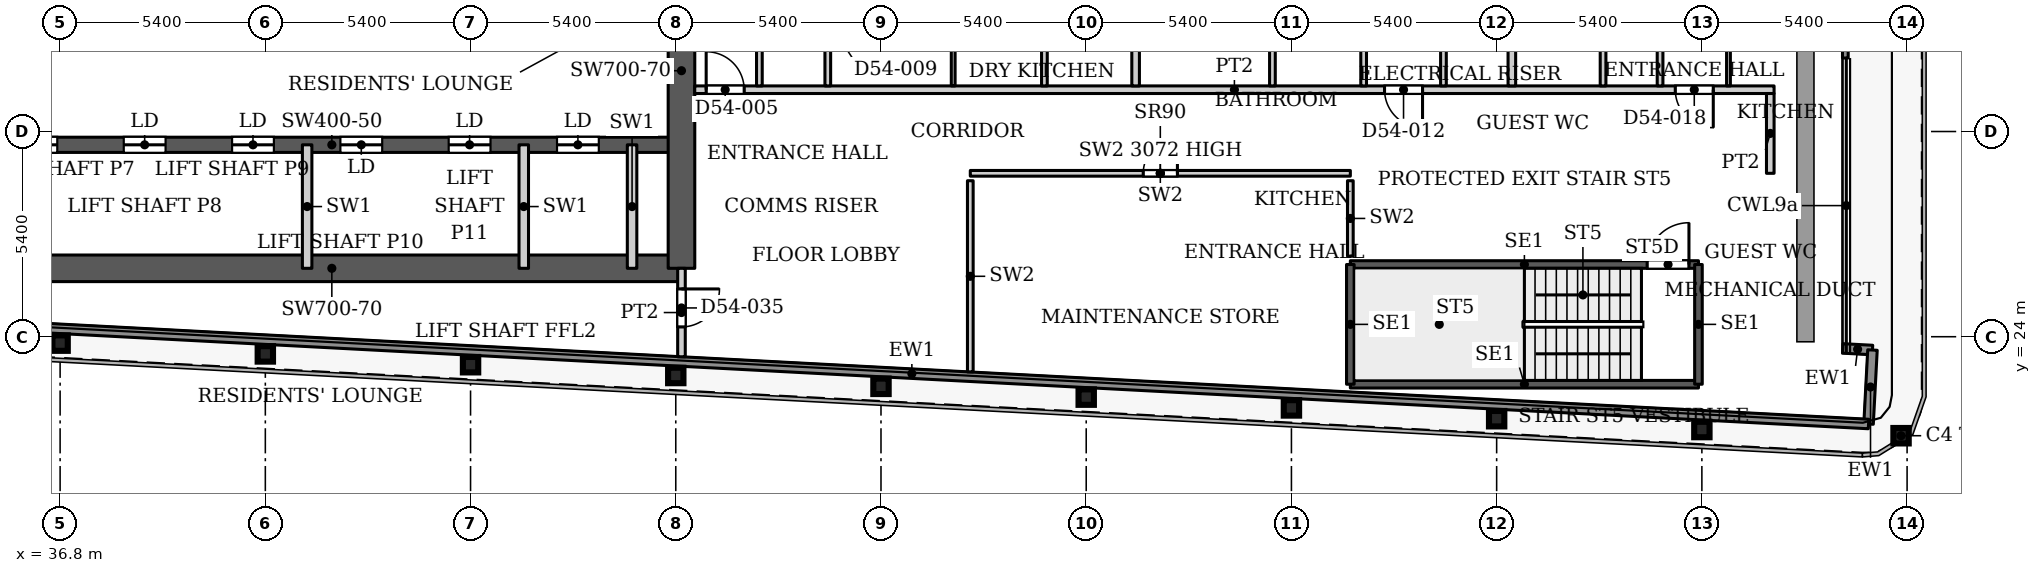
"""IFC4 building model, lengths in metres.
Left out: names, types, materials, properties, quantities, classifications, styles, units other than length and angle.
Written with IfcOpenShell. Run it as: python <this file> out.ifc"""

import sys

from ifc_helpers import new_model, si_unit, direction, frame, frame_2d, origin, origin_2d, place, context, subcontext, project, spatial, rectangle, i_section, extrude, source, transform, mapped, element, fill, save


model = new_model("IFC4")
c1 = context("Model", 3, precision=1e-05, world=origin(), true_north=direction((0.0, 1.0)))
c2 = subcontext(c1, "Body", "Model", "MODEL_VIEW")
j1 = project(units=[si_unit("LENGTHUNIT", "METRE"), si_unit("PLANEANGLEUNIT", "RADIAN")], contexts=[c1])
p1 = place(None, origin())
s1 = spatial("IfcSite", under=j1, at=p1, CompositionType="ELEMENT")
p2 = place(p1, origin())
s2 = spatial("IfcBuilding", under=s1, at=p2, CompositionType="ELEMENT")
p3 = place(p2, frame((0.0, 0.0, 235.7)))
s3 = spatial("IfcBuildingStorey", under=s2, at=p3, CompositionType="ELEMENT", Elevation=235.7)
for number, where, z_axis, x_axis in (
    (1, (85.241, 21.395, 0.0), (0.0, 0.0, 1.0), (1.0, 0.0, 0.0)),
    (2, (80.0, 21.558, 0.0), (0.0, 0.0, 1.0), (1.0, 0.0, 0.0)),
    (3, (74.6, 21.843, 0.0), (0.0, 0.0, 1.0), (1.0, 0.0, 0.0)),
    (4, (69.2, 22.127, 0.0), (0.0, 0.0, 1.0), (1.0, 0.0, 0.0)),
    (5, (63.8, 22.411, 0.0), (0.0, 0.0, 1.0), (1.0, 0.0, 0.0)),
    (6, (58.4, 22.695, 0.0), (0.0, 0.0, 1.0), (1.0, 0.0, 0.0)),
    (7, (53.0, 22.98, 0.0), (0.0, 0.0, 1.0), (1.0, 0.0, 0.0)),
    (8, (47.6, 23.264, 0.0), (0.0, 0.0, 1.0), (1.0, 0.0, 0.0)),
    (9, (42.2, 23.548, 0.0), (0.0, 0.0, 1.0), (1.0, 0.0, 0.0)),
    (10, (36.8, 23.832, 0.0), (0.0, 0.0, 1.0), (1.0, 0.0, 0.0)),
):
    element("IfcColumn", number, at=place(p3, frame(where, z_axis=z_axis, x_axis=x_axis)), inside=s3, PredefinedType="COLUMN", context=c2, shape_type="SweptSolid", body=[
        extrude(i_section(OverallWidth=0.404, OverallDepth=0.407, WebThickness=0.027, FlangeThickness=0.044, FilletRadius=0.012, at=origin_2d()), origin(), (0.0, 0.0, 1.0), 3.9),
    ])
p4 = place(p3, frame((34.75, 25.8, 0.0), z_axis=(0.0, 0.0, 1.0), x_axis=(1.0, 0.0, 0.0)))
e11 = element("IfcWall", 11, at=p4, inside=s3, PredefinedType="SHEAR", context=c2, shape_type="SweptSolid", body=[
    extrude(rectangle(XDim=18.4, YDim=0.7, at=frame_2d((9.2, 0.0))), origin(), (0.0, 0.0, 1.0), 3.9),
])
p5 = place(p3, frame((34.75, 29.05, 0.0), z_axis=(0.0, 0.0, 1.0), x_axis=(1.0, 0.0, 0.0)))
e12 = element("IfcWall", 12, at=p5, inside=s3, PredefinedType="SHEAR", context=c2, shape_type="SweptSolid", body=[
    extrude(rectangle(XDim=18.4, YDim=0.4, at=frame_2d((9.2, 0.0))), origin(), (0.0, 0.0, 1.0), 3.9),
])
p6 = place(p5, frame((0.875, 0.0, 0.0)))
e13 = element("IfcOpeningElement", 13, at=p6, cuts=e12, PredefinedType="OPENING", context=c2, shape_type="SweptSolid", body=[
    extrude(rectangle(XDim=1.1, YDim=2.2, at=frame_2d((0.55, 1.1))), frame((0.0, 0.21, 0.0), z_axis=(0.0, -1.0, 0.0), x_axis=(1.0, 0.0, 0.0)), (0.0, 0.0, 1.0), 0.42),
])
p7 = place(p5, frame((3.725, 0.0, 0.0)))
e14 = element("IfcOpeningElement", 14, at=p7, cuts=e12, PredefinedType="OPENING", context=c2, shape_type="SweptSolid", body=[
    extrude(rectangle(XDim=1.1, YDim=2.2, at=frame_2d((0.55, 1.1))), frame((0.0, 0.21, 0.0), z_axis=(0.0, -1.0, 0.0), x_axis=(1.0, 0.0, 0.0)), (0.0, 0.0, 1.0), 0.42),
])
p8 = place(p5, frame((6.575, 0.0, 0.0)))
e15 = element("IfcOpeningElement", 15, at=p8, cuts=e12, PredefinedType="OPENING", context=c2, shape_type="SweptSolid", body=[
    extrude(rectangle(XDim=1.1, YDim=2.2, at=frame_2d((0.55, 1.1))), frame((0.0, 0.21, 0.0), z_axis=(0.0, -1.0, 0.0), x_axis=(1.0, 0.0, 0.0)), (0.0, 0.0, 1.0), 0.42),
])
p9 = place(p5, frame((9.425, 0.0, 0.0)))
e16 = element("IfcOpeningElement", 16, at=p9, cuts=e12, PredefinedType="OPENING", context=c2, shape_type="SweptSolid", body=[
    extrude(rectangle(XDim=1.1, YDim=2.2, at=frame_2d((0.55, 1.1))), frame((0.0, 0.21, 0.0), z_axis=(0.0, -1.0, 0.0), x_axis=(1.0, 0.0, 0.0)), (0.0, 0.0, 1.0), 0.42),
])
p10 = place(p5, frame((12.275, 0.0, 0.0)))
e17 = element("IfcOpeningElement", 17, at=p10, cuts=e12, PredefinedType="OPENING", context=c2, shape_type="SweptSolid", body=[
    extrude(rectangle(XDim=1.1, YDim=2.2, at=frame_2d((0.55, 1.1))), frame((0.0, 0.21, 0.0), z_axis=(0.0, -1.0, 0.0), x_axis=(1.0, 0.0, 0.0)), (0.0, 0.0, 1.0), 0.42),
])
p11 = place(p5, frame((15.125, 0.0, 0.0)))
e18 = element("IfcOpeningElement", 18, at=p11, cuts=e12, PredefinedType="OPENING", context=c2, shape_type="SweptSolid", body=[
    extrude(rectangle(XDim=1.1, YDim=2.2, at=frame_2d((0.55, 1.1))), frame((0.0, 0.21, 0.0), z_axis=(0.0, -1.0, 0.0), x_axis=(1.0, 0.0, 0.0)), (0.0, 0.0, 1.0), 0.42),
])
p12 = place(p3, frame((53.15, 25.8, 0.0), z_axis=(0.0, 0.0, 1.0), x_axis=(0.0, 1.0, 0.0)))
e19 = element("IfcWall", 19, at=p12, inside=s3, PredefinedType="SHEAR", context=c2, shape_type="SweptSolid", body=[
    extrude(rectangle(XDim=10.4, YDim=0.7, at=frame_2d((5.2, 0.0))), origin(), (0.0, 0.0, 1.0), 3.9),
])
p13 = place(p3, frame((83.775, 33.733, 0.0), z_axis=(0.0, 0.0, 1.0), x_axis=(0.0, -1.0, 0.0)))
e20 = element("IfcWall", 20, at=p13, inside=s3, PredefinedType="SOLIDWALL", context=c2, shape_type="SweptSolid", body=[
    extrude(rectangle(XDim=2.399, YDim=0.15, at=frame_2d((1.199, 0.0))), origin(), (0.0, 0.0, 1.0), 3.75),
])
p14 = place(p13, frame((0.3, 0.0, 0.0)))
e21 = element("IfcOpeningElement", 21, at=p14, cuts=e20, PredefinedType="OPENING", context=c2, shape_type="SweptSolid", body=[
    extrude(rectangle(XDim=1.8, YDim=2.4, at=frame_2d((0.9, 1.2))), frame((0.0, 0.085, 0.0), z_axis=(0.0, -1.0, 0.0), x_axis=(1.0, 0.0, 0.0)), (0.0, 0.0, 1.0), 0.17),
])
p15 = place(p3, frame((83.707, 23.692, 0.0), z_axis=(0.0, 0.0, 1.0), x_axis=(0.998561284263, -0.053622398031, 0.0)))
e22 = element("IfcWall", 22, at=p15, inside=s3, PredefinedType="SOLIDWALL", context=c2, shape_type="SweptSolid", body=[
    extrude(rectangle(XDim=0.783, YDim=0.25, at=frame_2d((0.392, 0.0))), origin(), (0.0, 0.0, 1.0), 3.75),
])
p16 = place(p3, frame((84.489, 23.65, 0.0), z_axis=(0.0, 0.0, 1.0), x_axis=(-0.052841433274, -0.998602915542, 0.0)))
e23 = element("IfcWall", 23, at=p16, inside=s3, PredefinedType="SOLIDWALL", context=c2, shape_type="SweptSolid", body=[
    extrude(rectangle(XDim=1.95, YDim=0.25, at=frame_2d((0.975, 0.0))), origin(), (0.0, 0.0, 1.0), 3.75),
])
p17 = place(p3, frame((84.386, 21.703, 0.0), z_axis=(0.0, 0.0, 1.0), x_axis=(-0.998617508267, 0.05256493302, 0.0)))
e24 = element("IfcWall", 24, at=p17, inside=s3, PredefinedType="SOLIDWALL", context=c2, shape_type="SweptSolid", body=[
    extrude(rectangle(XDim=50.417, YDim=0.25, at=frame_2d((25.208, 0.0))), origin(), (0.0, 0.0, 1.0), 3.75),
])
p18 = place(p3, frame((70.75, 22.75, 0.0), z_axis=(0.0, 0.0, 1.0), x_axis=(1.0, 0.0, 0.0)))
e25 = element("IfcWall", 25, at=p18, inside=s3, PredefinedType="SHEAR", context=c2, shape_type="SweptSolid", body=[
    extrude(rectangle(XDim=9.16, YDim=0.2, at=frame_2d((4.58, 0.0))), origin(), (0.0, 0.0, 1.0), 3.9),
])
p19 = place(p3, frame((70.75, 25.9, 0.0), z_axis=(0.0, 0.0, 1.0), x_axis=(1.0, 0.0, 0.0)))
e26 = element("IfcWall", 26, at=p19, inside=s3, PredefinedType="SHEAR", context=c2, shape_type="SweptSolid", body=[
    extrude(rectangle(XDim=9.16, YDim=0.2, at=frame_2d((4.58, 0.0))), origin(), (0.0, 0.0, 1.0), 3.9),
])
p20 = place(p19, frame((7.81, 0.0, 0.0)))
e27 = element("IfcOpeningElement", 27, at=p20, cuts=e26, PredefinedType="OPENING", context=c2, shape_type="SweptSolid", body=[
    extrude(rectangle(XDim=1.1, YDim=2.2, at=frame_2d((0.55, 1.1))), frame((0.0, 0.11, 0.0), z_axis=(0.0, -1.0, 0.0), x_axis=(1.0, 0.0, 0.0)), (0.0, 0.0, 1.0), 0.22),
])
for number, where, z_axis, x_axis in (
    (28, (70.75, 22.75, 0.0), (0.0, 0.0, 1.0), (0.0, 1.0, 0.0)),
    (29, (79.91, 22.75, 0.0), (0.0, 0.0, 1.0), (0.0, 1.0, 0.0)),
):
    element("IfcWall", number, at=place(p3, frame(where, z_axis=z_axis, x_axis=x_axis)), inside=s3, PredefinedType="SHEAR", context=c2, shape_type="SweptSolid", body=[
        extrude(rectangle(XDim=3.15, YDim=0.2, at=frame_2d((1.575, 0.0))), origin(), (0.0, 0.0, 1.0), 3.9),
    ])
for number, where, z_axis, x_axis in (
    (30, (43.3, 25.8, 0.0), (0.0, 0.0, 1.0), (0.0, 1.0, 0.0)),
    (31, (49.0, 25.8, 0.0), (0.0, 0.0, 1.0), (0.0, 1.0, 0.0)),
    (32, (51.85, 25.8, 0.0), (0.0, 0.0, 1.0), (0.0, 1.0, 0.0)),
):
    element("IfcWall", number, at=place(p3, frame(where, z_axis=z_axis, x_axis=x_axis)), inside=s3, PredefinedType="PARTITIONING", context=c2, shape_type="SweptSolid", body=[
        extrude(rectangle(XDim=3.25, YDim=0.25, at=frame_2d((1.625, 0.0))), origin(), (0.0, 0.0, 1.0), 3.9),
    ])
p21 = place(p3, frame((60.75, 28.3, 0.0), z_axis=(0.0, 0.0, 1.0), x_axis=(1.0, 0.0, 0.0)))
e33 = element("IfcWall", 33, at=p21, inside=s3, PredefinedType="PARTITIONING", context=c2, shape_type="SweptSolid", body=[
    extrude(rectangle(XDim=10.0, YDim=0.15, at=frame_2d((5.0, 0.0))), origin(), (0.0, 0.0, 1.0), 3.072),
])
p22 = place(p21, frame((4.55, 0.0, 0.0)))
e34 = element("IfcOpeningElement", 34, at=p22, cuts=e33, PredefinedType="OPENING", context=c2, shape_type="SweptSolid", body=[
    extrude(rectangle(XDim=0.9, YDim=2.2, at=frame_2d((0.45, 1.1))), frame((0.0, 0.085, 0.0), z_axis=(0.0, -1.0, 0.0), x_axis=(1.0, 0.0, 0.0)), (0.0, 0.0, 1.0), 0.17),
])
p23 = place(p3, frame((60.75, 23.075, 0.0), z_axis=(0.0, 0.0, 1.0), x_axis=(0.0, 1.0, 0.0)))
e35 = element("IfcWall", 35, at=p23, inside=s3, PredefinedType="PARTITIONING", context=c2, shape_type="SweptSolid", body=[
    extrude(rectangle(XDim=5.03, YDim=0.15, at=frame_2d((2.515, 0.0))), origin(), (0.0, 0.0, 1.0), 3.9),
])
p24 = place(p3, frame((70.75, 26.12, 0.0), z_axis=(0.0, 0.0, 1.0), x_axis=(0.0, 1.0, 0.0)))
e36 = element("IfcWall", 36, at=p24, inside=s3, PredefinedType="PARTITIONING", context=c2, shape_type="SweptSolid", body=[
    extrude(rectangle(XDim=1.985, YDim=0.15, at=frame_2d((0.992, 0.0))), origin(), (0.0, 0.0, 1.0), 3.9),
])
p25 = place(p3, frame((53.15, 23.472, 0.0), z_axis=(0.0, 0.0, 1.0), x_axis=(0.0, 1.0, 0.0)))
e37 = element("IfcWall", 37, at=p25, inside=s3, PredefinedType="PARTITIONING", context=c2, shape_type="SweptSolid", body=[
    extrude(rectangle(XDim=2.328, YDim=0.2, at=frame_2d((1.164, 0.0))), origin(), (0.0, 0.0, 1.0), 3.6),
])
p26 = place(p25, frame((0.785, 0.0, 0.0)))
e38 = element("IfcOpeningElement", 38, at=p26, cuts=e37, PredefinedType="OPENING", context=c2, shape_type="SweptSolid", body=[
    extrude(rectangle(XDim=1.0, YDim=2.1, at=frame_2d((0.5, 1.05))), frame((0.0, 0.11, 0.0), z_axis=(0.0, -1.0, 0.0), x_axis=(1.0, 0.0, 0.0)), (0.0, 0.0, 1.0), 0.22),
])
p27 = place(p3, frame((53.499, 30.5, 0.0), z_axis=(0.0, 0.0, 1.0), x_axis=(1.0, 0.0, 0.0)))
e39 = element("IfcWall", 39, at=p27, inside=s3, PredefinedType="PARTITIONING", context=c2, shape_type="SweptSolid", body=[
    extrude(rectangle(XDim=28.401, YDim=0.2, at=frame_2d((14.2, 0.0))), origin(), (0.0, 0.0, 1.0), 3.6),
])
p28 = place(p27, frame((0.301, 0.0, 0.0)))
e40 = element("IfcOpeningElement", 40, at=p28, cuts=e39, PredefinedType="OPENING", context=c2, shape_type="SweptSolid", body=[
    extrude(rectangle(XDim=1.0, YDim=2.1, at=frame_2d((0.5, 1.05))), frame((0.0, 0.11, 0.0), z_axis=(0.0, -1.0, 0.0), x_axis=(1.0, 0.0, 0.0)), (0.0, 0.0, 1.0), 0.22),
])
p29 = place(p27, frame((18.151, 0.0, 0.0)))
e41 = element("IfcOpeningElement", 41, at=p29, cuts=e39, PredefinedType="OPENING", context=c2, shape_type="SweptSolid", body=[
    extrude(rectangle(XDim=1.0, YDim=2.1, at=frame_2d((0.5, 1.05))), frame((0.0, 0.11, 0.0), z_axis=(0.0, -1.0, 0.0), x_axis=(1.0, 0.0, 0.0)), (0.0, 0.0, 1.0), 0.22),
])
p30 = place(p27, frame((25.801, 0.0, 0.0)))
e42 = element("IfcOpeningElement", 42, at=p30, cuts=e39, PredefinedType="OPENING", context=c2, shape_type="SweptSolid", body=[
    extrude(rectangle(XDim=1.0, YDim=2.1, at=frame_2d((0.5, 1.05))), frame((0.0, 0.11, 0.0), z_axis=(0.0, -1.0, 0.0), x_axis=(1.0, 0.0, 0.0)), (0.0, 0.0, 1.0), 0.22),
])
for number, where, z_axis, x_axis in (
    (43, (55.2, 30.6, 0.0), (0.0, 0.0, 1.0), (0.0, 1.0, 0.0)),
    (44, (57.0, 30.6, 0.0), (0.0, 0.0, 1.0), (0.0, 1.0, 0.0)),
):
    element("IfcWall", number, at=place(p3, frame(where, z_axis=z_axis, x_axis=x_axis)), inside=s3, PredefinedType="PARTITIONING", context=c2, shape_type="SweptSolid", body=[
        extrude(rectangle(XDim=3.025, YDim=0.15, at=frame_2d((1.512, 0.0))), origin(), (0.0, 0.0, 1.0), 3.6),
    ])
p31 = place(p3, frame((60.3, 30.6, 0.0), z_axis=(0.0, 0.0, 1.0), x_axis=(0.0, 1.0, 0.0)))
e45 = element("IfcWall", 45, at=p31, inside=s3, PredefinedType="PARTITIONING", context=c2, shape_type="SweptSolid", body=[
    extrude(rectangle(XDim=3.025, YDim=0.1, at=frame_2d((1.512, 0.0))), origin(), (0.0, 0.0, 1.0), 3.6),
])
p32 = place(p3, frame((62.7, 30.6, 0.0), z_axis=(0.0, 0.0, 1.0), x_axis=(0.0, 1.0, 0.0)))
e46 = element("IfcWall", 46, at=p32, inside=s3, PredefinedType="PARTITIONING", context=c2, shape_type="SweptSolid", body=[
    extrude(rectangle(XDim=3.025, YDim=0.15, at=frame_2d((1.512, 0.0))), origin(), (0.0, 0.0, 1.0), 3.6),
])
p33 = place(p3, frame((65.1, 30.6, 0.0), z_axis=(0.0, 0.0, 1.0), x_axis=(0.0, 1.0, 0.0)))
e47 = element("IfcWall", 47, at=p33, inside=s3, PredefinedType="PARTITIONING", context=c2, shape_type="SweptSolid", body=[
    extrude(rectangle(XDim=13.3, YDim=0.2, at=frame_2d((6.65, 0.0))), origin(), (0.0, 0.0, 1.0), 3.6),
])
for number, where, z_axis, x_axis in (
    (48, (68.7, 30.6, 0.0), (0.0, 0.0, 1.0), (0.0, 1.0, 0.0)),
    (49, (71.1, 30.6, 0.0), (0.0, 0.0, 1.0), (0.0, 1.0, 0.0)),
):
    element("IfcWall", number, at=place(p3, frame(where, z_axis=z_axis, x_axis=x_axis)), inside=s3, PredefinedType="PARTITIONING", context=c2, shape_type="SweptSolid", body=[
        extrude(rectangle(XDim=3.025, YDim=0.15, at=frame_2d((1.512, 0.0))), origin(), (0.0, 0.0, 1.0), 3.6),
    ])
p34 = place(p3, frame((73.2, 30.6, 0.0), z_axis=(0.0, 0.0, 1.0), x_axis=(0.0, 1.0, 0.0)))
e50 = element("IfcWall", 50, at=p34, inside=s3, PredefinedType="PARTITIONING", context=c2, shape_type="SweptSolid", body=[
    extrude(rectangle(XDim=3.175, YDim=0.15, at=frame_2d((1.587, 0.0))), origin(), (0.0, 0.0, 1.0), 3.6),
])
p35 = place(p3, frame((75.0, 30.6, 0.0), z_axis=(0.0, 0.0, 1.0), x_axis=(0.0, 1.0, 0.0)))
e51 = element("IfcWall", 51, at=p35, inside=s3, PredefinedType="PARTITIONING", context=c2, shape_type="SweptSolid", body=[
    extrude(rectangle(XDim=13.3, YDim=0.2, at=frame_2d((6.65, 0.0))), origin(), (0.0, 0.0, 1.0), 3.6),
])
for number, where, z_axis, x_axis in (
    (52, (77.4, 30.6, 0.0), (0.0, 0.0, 1.0), (0.0, 1.0, 0.0)),
    (53, (78.9, 30.6, 0.0), (0.0, 0.0, 1.0), (0.0, 1.0, 0.0)),
):
    element("IfcWall", number, at=place(p3, frame(where, z_axis=z_axis, x_axis=x_axis)), inside=s3, PredefinedType="PARTITIONING", context=c2, shape_type="SweptSolid", body=[
        extrude(rectangle(XDim=3.025, YDim=0.15, at=frame_2d((1.512, 0.0))), origin(), (0.0, 0.0, 1.0), 3.6),
    ])
p36 = place(p3, frame((80.7, 30.6, 0.0), z_axis=(0.0, 0.0, 1.0), x_axis=(0.0, 1.0, 0.0)))
e54 = element("IfcWall", 54, at=p36, inside=s3, PredefinedType="PARTITIONING", context=c2, shape_type="SweptSolid", body=[
    extrude(rectangle(XDim=3.15, YDim=0.1, at=frame_2d((1.575, 0.0))), origin(), (0.0, 0.0, 1.0), 3.6),
])
p37 = place(p3, frame((81.8, 28.3, 0.0), z_axis=(0.0, 0.0, 1.0), x_axis=(0.0, 1.0, 0.0)))
e55 = element("IfcWall", 55, at=p37, inside=s3, PredefinedType="PARTITIONING", context=c2, shape_type="SweptSolid", body=[
    extrude(rectangle(XDim=2.1, YDim=0.2, at=frame_2d((1.05, 0.0))), origin(), (0.0, 0.0, 1.0), 3.6),
])
m1 = source(origin(), c2, "Body", "SweptSolid", [
    extrude(rectangle(XDim=1.1, YDim=2.2, at=frame_2d((0.55, 1.1))), frame((0.0, 0.025, 0.0), z_axis=(0.0, -1.0, 0.0), x_axis=(1.0, 0.0, 0.0)), (0.0, 0.0, 1.0), 0.05),
])
p38 = place(p6, origin())
e56 = element("IfcDoor", 56, at=p38, inside=s3, OperationType="SLIDING_TO_LEFT", PredefinedType="DOOR", context=c2, shape_type="MappedRepresentation", body=[
    mapped(m1, transform((0.0, 0.0, 0.0), x_axis=(1.0, 0.0, 0.0), y_axis=(0.0, 1.0, 0.0), z_axis=(0.0, 0.0, 1.0), scale=1.0)),
])
fill(e13, e56)
p39 = place(p7, origin())
e57 = element("IfcDoor", 57, at=p39, inside=s3, OperationType="SLIDING_TO_LEFT", PredefinedType="DOOR", context=c2, shape_type="MappedRepresentation", body=[
    mapped(m1, transform((0.0, 0.0, 0.0), x_axis=(1.0, 0.0, 0.0), y_axis=(0.0, 1.0, 0.0), z_axis=(0.0, 0.0, 1.0), scale=1.0)),
])
fill(e14, e57)
p40 = place(p8, origin())
e58 = element("IfcDoor", 58, at=p40, inside=s3, OperationType="SLIDING_TO_LEFT", PredefinedType="DOOR", context=c2, shape_type="MappedRepresentation", body=[
    mapped(m1, transform((0.0, 0.0, 0.0), x_axis=(1.0, 0.0, 0.0), y_axis=(0.0, 1.0, 0.0), z_axis=(0.0, 0.0, 1.0), scale=1.0)),
])
fill(e15, e58)
p41 = place(p9, origin())
e59 = element("IfcDoor", 59, at=p41, inside=s3, OperationType="SLIDING_TO_LEFT", PredefinedType="DOOR", context=c2, shape_type="MappedRepresentation", body=[
    mapped(m1, transform((0.0, 0.0, 0.0), x_axis=(1.0, 0.0, 0.0), y_axis=(0.0, 1.0, 0.0), z_axis=(0.0, 0.0, 1.0), scale=1.0)),
])
fill(e16, e59)
p42 = place(p10, origin())
e60 = element("IfcDoor", 60, at=p42, inside=s3, OperationType="SLIDING_TO_LEFT", PredefinedType="DOOR", context=c2, shape_type="MappedRepresentation", body=[
    mapped(m1, transform((0.0, 0.0, 0.0), x_axis=(1.0, 0.0, 0.0), y_axis=(0.0, 1.0, 0.0), z_axis=(0.0, 0.0, 1.0), scale=1.0)),
])
fill(e17, e60)
p43 = place(p11, origin())
e61 = element("IfcDoor", 61, at=p43, inside=s3, OperationType="SLIDING_TO_LEFT", PredefinedType="DOOR", context=c2, shape_type="MappedRepresentation", body=[
    mapped(m1, transform((0.0, 0.0, 0.0), x_axis=(1.0, 0.0, 0.0), y_axis=(0.0, 1.0, 0.0), z_axis=(0.0, 0.0, 1.0), scale=1.0)),
])
fill(e18, e61)
m2 = source(origin(), c2, "Body", "SweptSolid", [
    extrude(rectangle(XDim=0.9, YDim=2.2, at=frame_2d((0.45, 1.1))), frame((0.0, 0.025, 0.0), z_axis=(0.0, -1.0, 0.0), x_axis=(1.0, 0.0, 0.0)), (0.0, 0.0, 1.0), 0.05),
])
p44 = place(p22, origin())
e62 = element("IfcDoor", 62, at=p44, inside=s3, OperationType="SINGLE_SWING_LEFT", PredefinedType="DOOR", context=c2, shape_type="MappedRepresentation", body=[
    mapped(m2, transform((0.0, 0.0, 0.0), x_axis=(1.0, 0.0, 0.0), y_axis=(0.0, 1.0, 0.0), z_axis=(0.0, 0.0, 1.0), scale=1.0)),
])
fill(e34, e62)
m3 = source(origin(), c2, "Body", "SweptSolid", [
    extrude(rectangle(XDim=1.1, YDim=2.2, at=frame_2d((0.55, 1.1))), frame((0.0, 0.025, 0.0), z_axis=(0.0, -1.0, 0.0), x_axis=(1.0, 0.0, 0.0)), (0.0, 0.0, 1.0), 0.05),
])
p45 = place(p20, origin())
e63 = element("IfcDoor", 63, at=p45, inside=s3, OperationType="SINGLE_SWING_LEFT", PredefinedType="DOOR", context=c2, shape_type="MappedRepresentation", body=[
    mapped(m3, transform((0.0, 0.0, 0.0), x_axis=(1.0, 0.0, 0.0), y_axis=(0.0, 1.0, 0.0), z_axis=(0.0, 0.0, 1.0), scale=1.0)),
])
fill(e27, e63)
m4 = source(origin(), c2, "Body", "SweptSolid", [
    extrude(rectangle(XDim=1.0, YDim=2.1, at=frame_2d((0.5, 1.05))), frame((0.0, 0.025, 0.0), z_axis=(0.0, -1.0, 0.0), x_axis=(1.0, 0.0, 0.0)), (0.0, 0.0, 1.0), 0.05),
])
p46 = place(p28, origin())
e64 = element("IfcDoor", 64, at=p46, inside=s3, OperationType="SINGLE_SWING_LEFT", PredefinedType="DOOR", context=c2, shape_type="MappedRepresentation", body=[
    mapped(m4, transform((0.0, 0.0, 0.0), x_axis=(1.0, 0.0, 0.0), y_axis=(0.0, 1.0, 0.0), z_axis=(0.0, 0.0, 1.0), scale=1.0)),
])
fill(e40, e64)
p47 = place(p29, origin())
e65 = element("IfcDoor", 65, at=p47, inside=s3, OperationType="SINGLE_SWING_RIGHT", PredefinedType="DOOR", context=c2, shape_type="MappedRepresentation", body=[
    mapped(m4, transform((0.0, 0.0, 0.0), x_axis=(1.0, 0.0, 0.0), y_axis=(0.0, 1.0, 0.0), z_axis=(0.0, 0.0, 1.0), scale=1.0)),
])
fill(e41, e65)
p48 = place(p30, origin())
e66 = element("IfcDoor", 66, at=p48, inside=s3, OperationType="SINGLE_SWING_RIGHT", PredefinedType="DOOR", context=c2, shape_type="MappedRepresentation", body=[
    mapped(m4, transform((0.0, 0.0, 0.0), x_axis=(1.0, 0.0, 0.0), y_axis=(0.0, 1.0, 0.0), z_axis=(0.0, 0.0, 1.0), scale=1.0)),
])
fill(e42, e66)
m5 = source(origin(), c2, "Body", "SweptSolid", [
    extrude(rectangle(XDim=1.0, YDim=2.1, at=frame_2d((0.5, 1.05))), frame((0.0, 0.025, 0.0), z_axis=(0.0, -1.0, 0.0), x_axis=(1.0, 0.0, 0.0)), (0.0, 0.0, 1.0), 0.05),
])
p49 = place(p26, origin())
e67 = element("IfcDoor", 67, at=p49, inside=s3, OperationType="SINGLE_SWING_RIGHT", PredefinedType="DOOR", context=c2, shape_type="MappedRepresentation", body=[
    mapped(m5, transform((0.0, 0.0, 0.0), x_axis=(1.0, 0.0, 0.0), y_axis=(0.0, 1.0, 0.0), z_axis=(0.0, 0.0, 1.0), scale=1.0)),
])
fill(e38, e67)
save(model, sys.argv[1])
